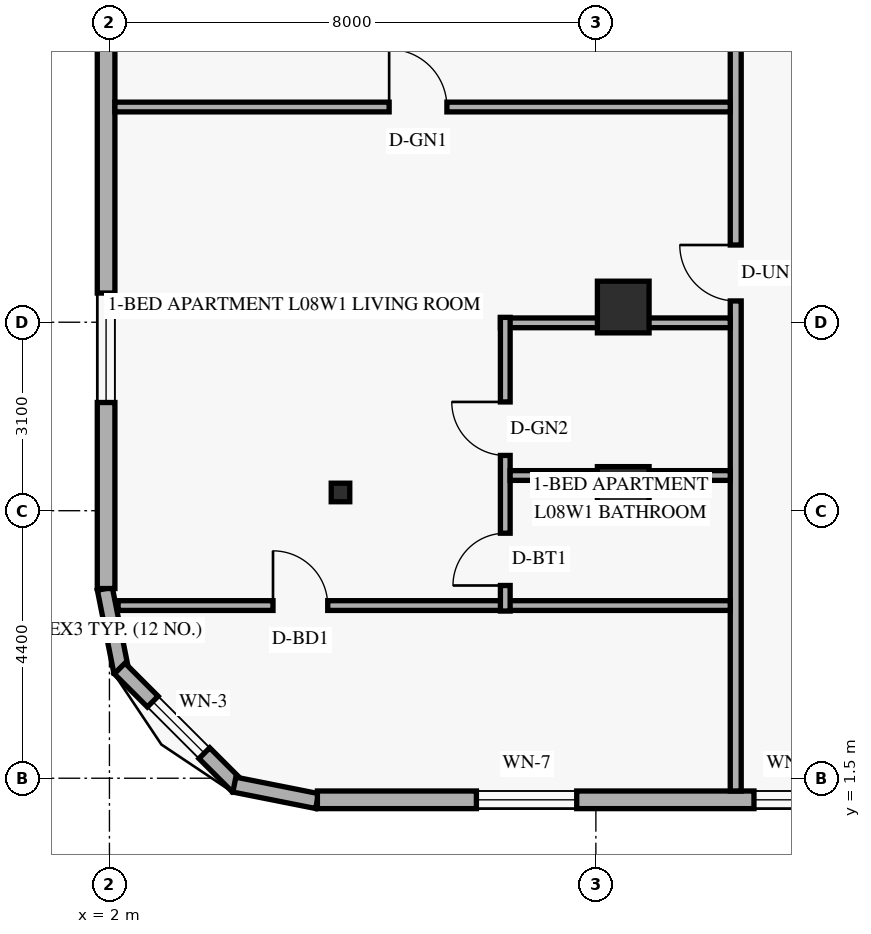
"""IFC4 building model, lengths in metres.
Left out: names, types, materials, properties, quantities, classifications, styles, units other than length and angle.
Written with IfcOpenShell. Run it as: python <this file> out.ifc"""

import sys

from ifc_helpers import new_model, si_unit, direction, frame, frame_2d, origin, origin_2d, place, context, subcontext, project, spatial, rectangle, hollow_rectangle, extrude, element, fill, save


model = new_model("IFC4")
c1 = context("Model", 3, precision=1e-05, world=origin(), true_north=direction((0.0, 1.0)))
c2 = subcontext(c1, "Body", "Model", "MODEL_VIEW")
j1 = project(units=[si_unit("LENGTHUNIT", "METRE"), si_unit("PLANEANGLEUNIT", "RADIAN")], contexts=[c1])
p1 = place(None, origin())
s1 = spatial("IfcSite", under=j1, at=p1, CompositionType="ELEMENT")
p2 = place(p1, origin())
s2 = spatial("IfcBuilding", under=s1, at=p2, CompositionType="ELEMENT")
p3 = place(p2, frame((0.0, 0.0, 34.8)))
s3 = spatial("IfcBuildingStorey", under=s2, at=p3, CompositionType="ELEMENT", Elevation=34.8)
for number, where, z_axis, x_axis in (
    (1, (5.8, 6.2, 0.0), (0.0, 0.0, 1.0), (1.0, 0.0, 0.0)),
    (2, (5.8, 9.25, 0.0), (0.0, 0.0, 1.0), (1.0, 0.0, 0.0)),
):
    element("IfcColumn", number, at=place(p3, frame(where, z_axis=z_axis, x_axis=x_axis)), inside=s3, PredefinedType="COLUMN", context=c2, shape_type="SweptSolid", body=[
        extrude(hollow_rectangle(XDim=0.305, YDim=0.305, WallThickness=0.013, at=origin_2d()), origin(), (0.0, 0.0, 1.0), 3.6),
    ])
for number, where, z_axis, x_axis in (
    (3, (10.45, 6.2, 0.0), (0.0, 0.0, 1.0), (1.0, 0.0, 0.0)),
    (4, (10.45, 9.25, 0.0), (0.0, 0.0, 1.0), (1.0, 0.0, 0.0)),
):
    element("IfcColumn", number, at=place(p3, frame(where, z_axis=z_axis, x_axis=x_axis)), inside=s3, PredefinedType="COLUMN", context=c2, shape_type="SweptSolid", body=[
        extrude(rectangle(XDim=0.85, YDim=0.85, at=origin_2d()), origin(), (0.0, 0.0, 1.0), 3.6),
    ])
p4 = place(p3, frame((1.924, 4.616, 0.0), z_axis=(0.0, 0.0, 1.0), x_axis=(0.19496651342, -0.980809899341, 0.0)))
e5 = element("IfcWall", 5, at=p4, inside=s3, PredefinedType="SOLIDWALL", context=c2, shape_type="SweptSolid", body=[
    extrude(rectangle(XDim=1.389, YDim=0.25, at=frame_2d((0.694, 0.0))), origin(), (0.0, 0.0, 1.0), 3.36),
])
p5 = place(p3, frame((2.168, 3.305, 0.0), z_axis=(0.0, 0.0, 1.0), x_axis=(0.707106781187, -0.707106781187, 0.0)))
e6 = element("IfcWall", 6, at=p5, inside=s3, PredefinedType="SOLIDWALL", context=c2, shape_type="SweptSolid", body=[
    extrude(rectangle(XDim=2.739, YDim=0.25, at=frame_2d((1.37, 0.0))), origin(), (0.0, 0.0, 1.0), 3.36),
])
p6 = place(p5, frame((0.77, 0.0, 0.85)))
e7 = element("IfcOpeningElement", 7, at=p6, cuts=e6, PredefinedType="OPENING", context=c2, shape_type="SweptSolid", body=[
    extrude(rectangle(XDim=1.2, YDim=1.5, at=frame_2d((0.6, 0.75))), frame((0.0, 0.135, 0.0), z_axis=(0.0, -1.0, 0.0), x_axis=(1.0, 0.0, 0.0)), (0.0, 0.0, 1.0), 0.27),
])
p7 = place(p3, frame((4.054, 1.395, 0.0), z_axis=(0.0, 0.0, 1.0), x_axis=(0.980809899341, -0.19496651342, 0.0)))
e8 = element("IfcWall", 8, at=p7, inside=s3, PredefinedType="SOLIDWALL", context=c2, shape_type="SweptSolid", body=[
    extrude(rectangle(XDim=1.389, YDim=0.25, at=frame_2d((0.694, 0.0))), origin(), (0.0, 0.0, 1.0), 3.36),
])
p8 = place(p3, frame((5.42, 1.145, 0.0), z_axis=(0.0, 0.0, 1.0), x_axis=(1.0, 0.0, 0.0)))
e9 = element("IfcWall", 9, at=p8, inside=s3, PredefinedType="SOLIDWALL", context=c2, shape_type="SweptSolid", body=[
    extrude(rectangle(XDim=39.56, YDim=0.29, at=frame_2d((19.78, 0.0))), origin(), (0.0, 0.0, 1.0), 3.36),
])
p9 = place(p8, frame((2.615, 0.0, 0.85)))
e10 = element("IfcOpeningElement", 10, at=p9, cuts=e9, PredefinedType="OPENING", context=c2, shape_type="SweptSolid", body=[
    extrude(rectangle(XDim=1.65, YDim=1.6, at=frame_2d((0.825, 0.8))), frame((0.0, 0.155, 0.0), z_axis=(0.0, -1.0, 0.0), x_axis=(1.0, 0.0, 0.0)), (0.0, 0.0, 1.0), 0.31),
])
p10 = place(p8, frame((7.18, 0.0, 0.85)))
e11 = element("IfcOpeningElement", 11, at=p10, cuts=e9, PredefinedType="OPENING", context=c2, shape_type="SweptSolid", body=[
    extrude(rectangle(XDim=1.2, YDim=1.5, at=frame_2d((0.6, 0.75))), frame((0.0, 0.155, 0.0), z_axis=(0.0, -1.0, 0.0), x_axis=(1.0, 0.0, 0.0)), (0.0, 0.0, 1.0), 0.31),
])
p11 = place(p8, frame((11.906, 0.0, 0.85)))
e12 = element("IfcOpeningElement", 12, at=p11, cuts=e9, PredefinedType="OPENING", context=c2, shape_type="SweptSolid", body=[
    extrude(rectangle(XDim=1.65, YDim=1.6, at=frame_2d((0.825, 0.8))), frame((0.0, 0.155, 0.0), z_axis=(0.0, -1.0, 0.0), x_axis=(1.0, 0.0, 0.0)), (0.0, 0.0, 1.0), 0.31),
])
p12 = place(p8, frame((18.515, 0.0, 0.85)))
e13 = element("IfcOpeningElement", 13, at=p12, cuts=e9, PredefinedType="OPENING", context=c2, shape_type="SweptSolid", body=[
    extrude(rectangle(XDim=1.65, YDim=1.6, at=frame_2d((0.825, 0.8))), frame((0.0, 0.155, 0.0), z_axis=(0.0, -1.0, 0.0), x_axis=(1.0, 0.0, 0.0)), (0.0, 0.0, 1.0), 0.31),
])
p13 = place(p8, frame((25.124, 0.0, 0.85)))
e14 = element("IfcOpeningElement", 14, at=p13, cuts=e9, PredefinedType="OPENING", context=c2, shape_type="SweptSolid", body=[
    extrude(rectangle(XDim=1.65, YDim=1.6, at=frame_2d((0.825, 0.8))), frame((0.0, 0.155, 0.0), z_axis=(0.0, -1.0, 0.0), x_axis=(1.0, 0.0, 0.0)), (0.0, 0.0, 1.0), 0.31),
])
p14 = place(p8, frame((30.465, 0.0, 0.85)))
e15 = element("IfcOpeningElement", 15, at=p14, cuts=e9, PredefinedType="OPENING", context=c2, shape_type="SweptSolid", body=[
    extrude(rectangle(XDim=1.2, YDim=1.5, at=frame_2d((0.6, 0.75))), frame((0.0, 0.155, 0.0), z_axis=(0.0, -1.0, 0.0), x_axis=(1.0, 0.0, 0.0)), (0.0, 0.0, 1.0), 0.31),
])
p15 = place(p8, frame((32.613, 0.0, 0.85)))
e16 = element("IfcOpeningElement", 16, at=p15, cuts=e9, PredefinedType="OPENING", context=c2, shape_type="SweptSolid", body=[
    extrude(rectangle(XDim=1.65, YDim=1.6, at=frame_2d((0.825, 0.8))), frame((0.0, 0.155, 0.0), z_axis=(0.0, -1.0, 0.0), x_axis=(1.0, 0.0, 0.0)), (0.0, 0.0, 1.0), 0.31),
])
p16 = place(p8, frame((36.328, 0.0, 0.85)))
e17 = element("IfcOpeningElement", 17, at=p16, cuts=e9, PredefinedType="OPENING", context=c2, shape_type="SweptSolid", body=[
    extrude(rectangle(XDim=1.65, YDim=1.6, at=frame_2d((0.825, 0.8))), frame((0.0, 0.155, 0.0), z_axis=(0.0, -1.0, 0.0), x_axis=(1.0, 0.0, 0.0)), (0.0, 0.0, 1.0), 0.31),
])
p17 = place(p3, frame((1.945, 43.38, 0.0), z_axis=(0.0, 0.0, 1.0), x_axis=(0.0, -1.0, 0.0)))
e18 = element("IfcWall", 18, at=p17, inside=s3, PredefinedType="SOLIDWALL", context=c2, shape_type="SweptSolid", body=[
    extrude(rectangle(XDim=38.76, YDim=0.29, at=frame_2d((19.38, 0.0))), origin(), (0.0, 0.0, 1.0), 3.36),
])
p18 = place(p17, frame((33.9, 0.0, 0.85)))
e19 = element("IfcOpeningElement", 19, at=p18, cuts=e18, PredefinedType="OPENING", context=c2, shape_type="SweptSolid", body=[
    extrude(rectangle(XDim=1.8, YDim=1.6, at=frame_2d((0.9, 0.8))), frame((0.0, 0.155, 0.0), z_axis=(0.0, -1.0, 0.0), x_axis=(1.0, 0.0, 0.0)), (0.0, 0.0, 1.0), 0.31),
])
p19 = place(p17, frame((27.89, 0.0, 0.85)))
e20 = element("IfcOpeningElement", 20, at=p19, cuts=e18, PredefinedType="OPENING", context=c2, shape_type="SweptSolid", body=[
    extrude(rectangle(XDim=1.8, YDim=1.6, at=frame_2d((0.9, 0.8))), frame((0.0, 0.155, 0.0), z_axis=(0.0, -1.0, 0.0), x_axis=(1.0, 0.0, 0.0)), (0.0, 0.0, 1.0), 0.31),
])
p20 = place(p17, frame((23.859, 0.0, 0.85)))
e21 = element("IfcOpeningElement", 21, at=p20, cuts=e18, PredefinedType="OPENING", context=c2, shape_type="SweptSolid", body=[
    extrude(rectangle(XDim=1.8, YDim=1.6, at=frame_2d((0.9, 0.8))), frame((0.0, 0.155, 0.0), z_axis=(0.0, -1.0, 0.0), x_axis=(1.0, 0.0, 0.0)), (0.0, 0.0, 1.0), 0.31),
])
p21 = place(p17, frame((18.034, 0.0, 0.85)))
e22 = element("IfcOpeningElement", 22, at=p21, cuts=e18, PredefinedType="OPENING", context=c2, shape_type="SweptSolid", body=[
    extrude(rectangle(XDim=1.8, YDim=1.6, at=frame_2d((0.9, 0.8))), frame((0.0, 0.155, 0.0), z_axis=(0.0, -1.0, 0.0), x_axis=(1.0, 0.0, 0.0)), (0.0, 0.0, 1.0), 0.31),
])
p22 = place(p17, frame((12.195, 0.0, 0.85)))
e23 = element("IfcOpeningElement", 23, at=p22, cuts=e18, PredefinedType="OPENING", context=c2, shape_type="SweptSolid", body=[
    extrude(rectangle(XDim=1.8, YDim=1.6, at=frame_2d((0.9, 0.8))), frame((0.0, 0.155, 0.0), z_axis=(0.0, -1.0, 0.0), x_axis=(1.0, 0.0, 0.0)), (0.0, 0.0, 1.0), 0.31),
])
p23 = place(p17, frame((7.255, 0.0, 0.85)))
e24 = element("IfcOpeningElement", 24, at=p23, cuts=e18, PredefinedType="OPENING", context=c2, shape_type="SweptSolid", body=[
    extrude(rectangle(XDim=1.8, YDim=1.6, at=frame_2d((0.9, 0.8))), frame((0.0, 0.155, 0.0), z_axis=(0.0, -1.0, 0.0), x_axis=(1.0, 0.0, 0.0)), (0.0, 0.0, 1.0), 0.31),
])
p24 = place(p17, frame((1.705, 0.0, 0.85)))
e25 = element("IfcOpeningElement", 25, at=p24, cuts=e18, PredefinedType="OPENING", context=c2, shape_type="SweptSolid", body=[
    extrude(rectangle(XDim=1.8, YDim=1.6, at=frame_2d((0.9, 0.8))), frame((0.0, 0.155, 0.0), z_axis=(0.0, -1.0, 0.0), x_axis=(1.0, 0.0, 0.0)), (0.0, 0.0, 1.0), 0.31),
])
p25 = place(p3, frame((12.3, 1.29, 0.0), z_axis=(0.0, 0.0, 1.0), x_axis=(0.0, 1.0, 0.0)))
e26 = element("IfcWall", 26, at=p25, inside=s3, PredefinedType="STANDARD", context=c2, shape_type="SweptSolid", body=[
    extrude(rectangle(XDim=45.42, YDim=0.18, at=frame_2d((22.71, 0.0))), origin(), (0.0, 0.0, 1.0), 2.649),
])
p26 = place(p25, frame((8.06, 0.0, 0.0)))
e27 = element("IfcOpeningElement", 27, at=p26, cuts=e26, PredefinedType="OPENING", context=c2, shape_type="SweptSolid", body=[
    extrude(rectangle(XDim=0.92, YDim=2.15, at=frame_2d((0.46, 1.075))), frame((0.0, 0.1, 0.0), z_axis=(0.0, -1.0, 0.0), x_axis=(1.0, 0.0, 0.0)), (0.0, 0.0, 1.0), 0.2),
])
p27 = place(p25, frame((21.021, 0.0, 0.0)))
e28 = element("IfcOpeningElement", 28, at=p27, cuts=e26, PredefinedType="OPENING", context=c2, shape_type="SweptSolid", body=[
    extrude(rectangle(XDim=0.92, YDim=2.15, at=frame_2d((0.46, 1.075))), frame((0.0, 0.1, 0.0), z_axis=(0.0, -1.0, 0.0), x_axis=(1.0, 0.0, 0.0)), (0.0, 0.0, 1.0), 0.2),
])
p28 = place(p25, frame((35.99, 0.0, 0.0)))
e29 = element("IfcOpeningElement", 29, at=p28, cuts=e26, PredefinedType="OPENING", context=c2, shape_type="SweptSolid", body=[
    extrude(rectangle(XDim=0.92, YDim=2.15, at=frame_2d((0.46, 1.075))), frame((0.0, 0.1, 0.0), z_axis=(0.0, -1.0, 0.0), x_axis=(1.0, 0.0, 0.0)), (0.0, 0.0, 1.0), 0.2),
])
p29 = place(p3, frame((2.142, 4.34, 0.0), z_axis=(0.0, 0.0, 1.0), x_axis=(1.0, 0.0, 0.0)))
e30 = element("IfcWall", 30, at=p29, inside=s3, PredefinedType="PARTITIONING", context=c2, shape_type="SweptSolid", body=[
    extrude(rectangle(XDim=10.068, YDim=0.16, at=frame_2d((5.034, 0.0))), origin(), (0.0, 0.0, 1.0), 3.36),
])
p30 = place(p29, frame((2.548, 0.0, 0.0)))
e31 = element("IfcOpeningElement", 31, at=p30, cuts=e30, PredefinedType="OPENING", context=c2, shape_type="SweptSolid", body=[
    extrude(rectangle(XDim=0.9, YDim=2.14, at=frame_2d((0.45, 1.07))), frame((0.0, 0.09, 0.0), z_axis=(0.0, -1.0, 0.0), x_axis=(1.0, 0.0, 0.0)), (0.0, 0.0, 1.0), 0.18),
])
p31 = place(p3, frame((8.43, 8.99, 0.0), z_axis=(0.0, 0.0, 1.0), x_axis=(1.0, 0.0, 0.0)))
e32 = element("IfcWall", 32, at=p31, inside=s3, PredefinedType="PLUMBINGWALL", context=c2, shape_type="SweptSolid", body=[
    extrude(rectangle(XDim=3.78, YDim=0.16, at=frame_2d((1.89, 0.0))), origin(), (0.0, 0.0, 1.0), 3.36),
])
p32 = place(p3, frame((8.51, 4.25, 0.0), z_axis=(0.0, 0.0, 1.0), x_axis=(0.0, 1.0, 0.0)))
e33 = element("IfcWall", 33, at=p32, inside=s3, PredefinedType="PLUMBINGWALL", context=c2, shape_type="SweptSolid", body=[
    extrude(rectangle(XDim=4.83, YDim=0.16, at=frame_2d((2.415, 0.0))), origin(), (0.0, 0.0, 1.0), 2.809),
])
p33 = place(p32, frame((0.42, 0.0, 0.0)))
e34 = element("IfcOpeningElement", 34, at=p33, cuts=e33, PredefinedType="OPENING", context=c2, shape_type="SweptSolid", body=[
    extrude(rectangle(XDim=0.86, YDim=2.12, at=frame_2d((0.43, 1.06))), frame((0.0, 0.09, 0.0), z_axis=(0.0, -1.0, 0.0), x_axis=(1.0, 0.0, 0.0)), (0.0, 0.0, 1.0), 0.18),
])
p34 = place(p32, frame((2.559, 0.0, 0.0)))
e35 = element("IfcOpeningElement", 35, at=p34, cuts=e33, PredefinedType="OPENING", context=c2, shape_type="SweptSolid", body=[
    extrude(rectangle(XDim=0.88, YDim=2.12, at=frame_2d((0.44, 1.06))), frame((0.0, 0.09, 0.0), z_axis=(0.0, -1.0, 0.0), x_axis=(1.0, 0.0, 0.0)), (0.0, 0.0, 1.0), 0.18),
])
p35 = place(p3, frame((8.59, 6.479, 0.0), z_axis=(0.0, 0.0, 1.0), x_axis=(1.0, 0.0, 0.0)))
e36 = element("IfcWall", 36, at=p35, inside=s3, PredefinedType="PLUMBINGWALL", context=c2, shape_type="SweptSolid", body=[
    extrude(rectangle(XDim=3.62, YDim=0.16, at=frame_2d((1.81, 0.0))), origin(), (0.0, 0.0, 1.0), 3.36),
])
p36 = place(p3, frame((2.09, 12.54, 0.0), z_axis=(0.0, 0.0, 1.0), x_axis=(1.0, 0.0, 0.0)))
e37 = element("IfcWall", 37, at=p36, inside=s3, PredefinedType="PARTITIONING", context=c2, shape_type="SweptSolid", body=[
    extrude(rectangle(XDim=10.12, YDim=0.16, at=frame_2d((5.06, 0.0))), origin(), (0.0, 0.0, 1.0), 2.649),
])
p37 = place(p36, frame((4.51, 0.0, 0.0)))
e38 = element("IfcOpeningElement", 38, at=p37, cuts=e37, PredefinedType="OPENING", context=c2, shape_type="SweptSolid", body=[
    extrude(rectangle(XDim=0.95, YDim=2.15, at=frame_2d((0.475, 1.075))), frame((0.0, 0.09, 0.0), z_axis=(0.0, -1.0, 0.0), x_axis=(1.0, 0.0, 0.0)), (0.0, 0.0, 1.0), 0.18),
])
p38 = place(p6, origin())
e39 = element("IfcWindow", 39, at=p38, inside=s3, PartitioningType="SINGLE_PANEL", PredefinedType="WINDOW", context=c2, shape_type="SweptSolid", body=[
    extrude(rectangle(XDim=1.2, YDim=1.5, at=frame_2d((0.6, 0.75))), frame((0.0, 0.03, 0.0), z_axis=(0.0, -1.0, 0.0), x_axis=(1.0, 0.0, 0.0)), (0.0, 0.0, 1.0), 0.06),
])
fill(e7, e39)
p39 = place(p9, origin())
e40 = element("IfcWindow", 40, at=p39, inside=s3, PartitioningType="SINGLE_PANEL", PredefinedType="WINDOW", context=c2, shape_type="SweptSolid", body=[
    extrude(rectangle(XDim=1.65, YDim=1.6, at=frame_2d((0.825, 0.8))), frame((0.0, 0.03, 0.0), z_axis=(0.0, -1.0, 0.0), x_axis=(1.0, 0.0, 0.0)), (0.0, 0.0, 1.0), 0.06),
])
fill(e10, e40)
p40 = place(p10, origin())
e41 = element("IfcWindow", 41, at=p40, inside=s3, PartitioningType="SINGLE_PANEL", PredefinedType="WINDOW", context=c2, shape_type="SweptSolid", body=[
    extrude(rectangle(XDim=1.2, YDim=1.5, at=frame_2d((0.6, 0.75))), frame((0.0, 0.03, 0.0), z_axis=(0.0, -1.0, 0.0), x_axis=(1.0, 0.0, 0.0)), (0.0, 0.0, 1.0), 0.06),
])
fill(e11, e41)
p41 = place(p18, origin())
e42 = element("IfcWindow", 42, at=p41, inside=s3, PartitioningType="SINGLE_PANEL", PredefinedType="WINDOW", context=c2, shape_type="SweptSolid", body=[
    extrude(rectangle(XDim=1.8, YDim=1.6, at=frame_2d((0.9, 0.8))), frame((0.0, 0.03, 0.0), z_axis=(0.0, -1.0, 0.0), x_axis=(1.0, 0.0, 0.0)), (0.0, 0.0, 1.0), 0.06),
])
fill(e19, e42)
p42 = place(p37, origin())
e43 = element("IfcDoor", 43, at=p42, inside=s3, OperationType="SINGLE_SWING_LEFT", PredefinedType="DOOR", context=c2, shape_type="SweptSolid", body=[
    extrude(rectangle(XDim=0.95, YDim=2.15, at=frame_2d((0.475, 1.075))), frame((0.0, 0.025, 0.0), z_axis=(0.0, -1.0, 0.0), x_axis=(1.0, 0.0, 0.0)), (0.0, 0.0, 1.0), 0.05),
])
fill(e38, e43)
p43 = place(p26, origin())
e44 = element("IfcDoor", 44, at=p43, inside=s3, OperationType="SINGLE_SWING_RIGHT", PredefinedType="DOOR", context=c2, shape_type="SweptSolid", body=[
    extrude(rectangle(XDim=0.92, YDim=2.15, at=frame_2d((0.46, 1.075))), frame((0.0, 0.025, 0.0), z_axis=(0.0, -1.0, 0.0), x_axis=(1.0, 0.0, 0.0)), (0.0, 0.0, 1.0), 0.05),
])
fill(e27, e44)
p44 = place(p33, origin())
e45 = element("IfcDoor", 45, at=p44, inside=s3, OperationType="SINGLE_SWING_LEFT", PredefinedType="DOOR", context=c2, shape_type="SweptSolid", body=[
    extrude(rectangle(XDim=0.86, YDim=2.12, at=frame_2d((0.43, 1.06))), frame((0.0, 0.025, 0.0), z_axis=(0.0, -1.0, 0.0), x_axis=(1.0, 0.0, 0.0)), (0.0, 0.0, 1.0), 0.05),
])
fill(e34, e45)
p45 = place(p34, origin())
e46 = element("IfcDoor", 46, at=p45, inside=s3, OperationType="SINGLE_SWING_RIGHT", PredefinedType="DOOR", context=c2, shape_type="SweptSolid", body=[
    extrude(rectangle(XDim=0.88, YDim=2.12, at=frame_2d((0.44, 1.06))), frame((0.0, 0.025, 0.0), z_axis=(0.0, -1.0, 0.0), x_axis=(1.0, 0.0, 0.0)), (0.0, 0.0, 1.0), 0.05),
])
fill(e35, e46)
p46 = place(p30, origin())
e47 = element("IfcDoor", 47, at=p46, inside=s3, OperationType="SINGLE_SWING_LEFT", PredefinedType="DOOR", context=c2, shape_type="SweptSolid", body=[
    extrude(rectangle(XDim=0.9, YDim=2.14, at=frame_2d((0.45, 1.07))), frame((0.0, 0.025, 0.0), z_axis=(0.0, -1.0, 0.0), x_axis=(1.0, 0.0, 0.0)), (0.0, 0.0, 1.0), 0.05),
])
fill(e31, e47)
save(model, sys.argv[1])
